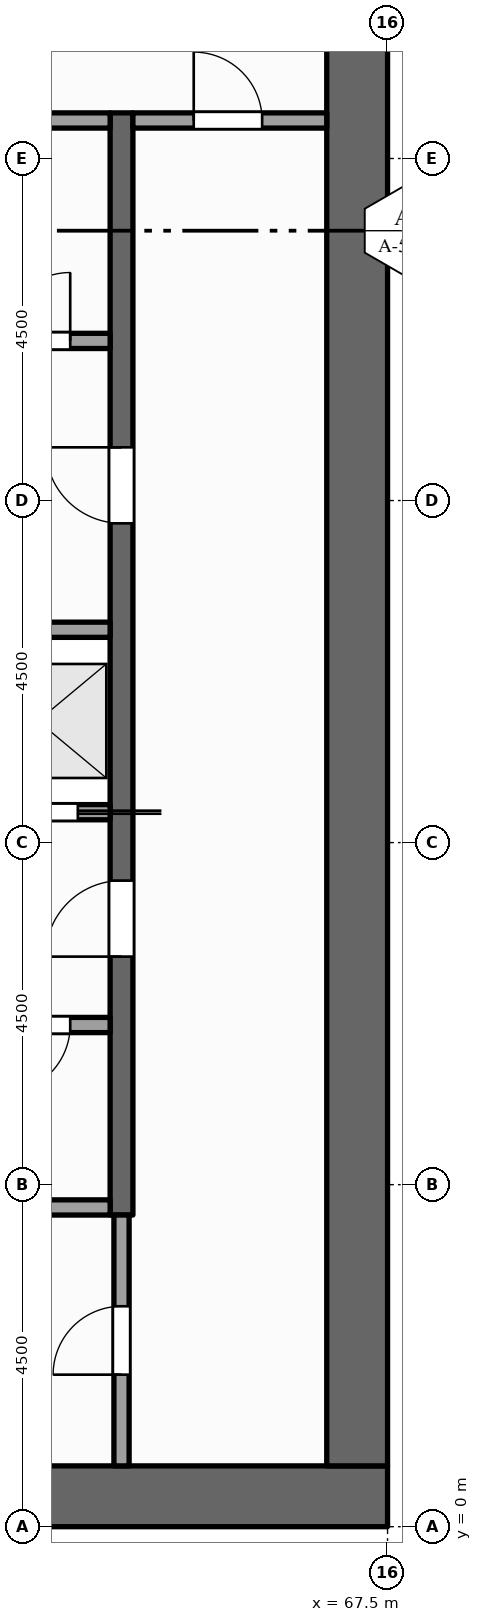
"""IFC4 building model, lengths in metres.
Left out: names, types, materials, properties, quantities, classifications, styles, units other than length and angle.
Written with IfcOpenShell. Run it as: python <this file> out.ifc"""

import sys

from ifc_helpers import new_model, si_unit, direction, frame, frame_2d, origin, place, context, subcontext, project, spatial, rectangle, extrude, element, fill, save


model = new_model("IFC4")
c1 = context("Model", 3, precision=1e-05, world=origin(), true_north=direction((0.0, 1.0)))
c2 = subcontext(c1, "Body", "Model", "MODEL_VIEW")
j1 = project(units=[si_unit("LENGTHUNIT", "METRE"), si_unit("PLANEANGLEUNIT", "RADIAN")], contexts=[c1])
p1 = place(None, origin())
s1 = spatial("IfcSite", under=j1, at=p1, CompositionType="ELEMENT")
p2 = place(p1, origin())
s2 = spatial("IfcBuilding", under=s1, at=p2, CompositionType="ELEMENT")
p3 = place(p2, frame((0.0, 0.0, 261.0)))
s3 = spatial("IfcBuildingStorey", under=s2, at=p3, CompositionType="ELEMENT", Elevation=261.0)
p4 = place(p3, frame((67.5, 0.4, -0.15), z_axis=(0.0, 0.0, 1.0), x_axis=(-1.0, 0.0, 0.0)))
e1 = element("IfcWall", 1, at=p4, inside=s3, PredefinedType="SHEAR", context=c2, shape_type="SweptSolid", body=[
    extrude(rectangle(XDim=13.5, YDim=0.8, at=frame_2d((6.75, 0.0))), origin(), (0.0, 0.0, 1.0), 4.0),
])
p5 = place(p3, frame((67.1, 0.8, -0.15), z_axis=(0.0, 0.0, 1.0), x_axis=(0.0, 1.0, 0.0)))
e2 = element("IfcWall", 2, at=p5, inside=s3, PredefinedType="SHEAR", context=c2, shape_type="SweptSolid", body=[
    extrude(rectangle(XDim=20.9, YDim=0.8, at=frame_2d((10.45, 0.0))), origin(), (0.0, 0.0, 1.0), 4.0),
])
p6 = place(p3, frame((64.0, 0.8, 0.0), z_axis=(0.0, 0.0, 1.0), x_axis=(0.0, 1.0, 0.0)))
e3 = element("IfcWall", 3, at=p6, inside=s3, PredefinedType="PARTITIONING", context=c2, shape_type="SweptSolid", body=[
    extrude(rectangle(XDim=3.3, YDim=0.2, at=frame_2d((1.65, 0.0))), origin(), (0.0, 0.0, 1.0), 3.85),
])
p7 = place(p6, frame((1.2, 0.0, 0.0)))
e4 = element("IfcOpeningElement", 4, at=p7, cuts=e3, PredefinedType="OPENING", context=c2, shape_type="SweptSolid", body=[
    extrude(rectangle(XDim=0.9, YDim=2.1, at=frame_2d((0.45, 1.05))), frame((0.0, 0.11, 0.0), z_axis=(0.0, -1.0, 0.0), x_axis=(1.0, 0.0, 0.0)), (0.0, 0.0, 1.0), 0.22),
])
p8 = place(p3, frame((64.0, 4.1, 0.0), z_axis=(0.0, 0.0, 1.0), x_axis=(0.0, 1.0, 0.0)))
e5 = element("IfcWall", 5, at=p8, inside=s3, PredefinedType="SHEAR", context=c2, shape_type="SweptSolid", body=[
    extrude(rectangle(XDim=14.5, YDim=0.3, at=frame_2d((7.25, 0.0))), origin(), (0.0, 0.0, 1.0), 3.85),
])
p9 = place(p8, frame((3.4, 0.0, 0.0)))
e6 = element("IfcOpeningElement", 6, at=p9, cuts=e5, PredefinedType="OPENING", context=c2, shape_type="SweptSolid", body=[
    extrude(rectangle(XDim=1.0, YDim=2.1, at=frame_2d((0.5, 1.05))), frame((0.0, 0.16, 0.0), z_axis=(0.0, -1.0, 0.0), x_axis=(1.0, 0.0, 0.0)), (0.0, 0.0, 1.0), 0.32),
])
p10 = place(p8, frame((9.1, 0.0, 0.0)))
e7 = element("IfcOpeningElement", 7, at=p10, cuts=e5, PredefinedType="OPENING", context=c2, shape_type="SweptSolid", body=[
    extrude(rectangle(XDim=1.0, YDim=2.1, at=frame_2d((0.5, 1.05))), frame((0.0, 0.16, 0.0), z_axis=(0.0, -1.0, 0.0), x_axis=(1.0, 0.0, 0.0)), (0.0, 0.0, 1.0), 0.32),
])
p11 = place(p3, frame((61.9, 4.2, 0.0), z_axis=(0.0, 0.0, 1.0), x_axis=(1.0, 0.0, 0.0)))
e8 = element("IfcWall", 8, at=p11, inside=s3, PredefinedType="PARTITIONING", context=c2, shape_type="SweptSolid", body=[
    extrude(rectangle(XDim=1.95, YDim=0.2, at=frame_2d((0.975, 0.0))), origin(), (0.0, 0.0, 1.0), 3.85),
])
p12 = place(p3, frame((61.9, 6.6, 0.0), z_axis=(0.0, 0.0, 1.0), x_axis=(1.0, 0.0, 0.0)))
e9 = element("IfcWall", 9, at=p12, inside=s3, PredefinedType="PARTITIONING", context=c2, shape_type="SweptSolid", body=[
    extrude(rectangle(XDim=1.95, YDim=0.2, at=frame_2d((0.975, 0.0))), origin(), (0.0, 0.0, 1.0), 3.85),
])
p13 = place(p12, frame((0.525, 0.0, 0.0)))
e10 = element("IfcOpeningElement", 10, at=p13, cuts=e9, PredefinedType="OPENING", context=c2, shape_type="SweptSolid", body=[
    extrude(rectangle(XDim=0.9, YDim=2.1, at=frame_2d((0.45, 1.05))), frame((0.0, 0.11, 0.0), z_axis=(0.0, -1.0, 0.0), x_axis=(1.0, 0.0, 0.0)), (0.0, 0.0, 1.0), 0.22),
])
p14 = place(p3, frame((61.9, 9.4, 0.0), z_axis=(0.0, 0.0, 1.0), x_axis=(1.0, 0.0, 0.0)))
e11 = element("IfcWall", 11, at=p14, inside=s3, PredefinedType="SOLIDWALL", context=c2, shape_type="SweptSolid", body=[
    extrude(rectangle(XDim=1.95, YDim=0.2, at=frame_2d((0.975, 0.0))), origin(), (0.0, 0.0, 1.0), 3.85),
])
p15 = place(p14, frame((0.425, 0.0, 0.012)))
e12 = element("IfcOpeningElement", 12, at=p15, cuts=e11, PredefinedType="OPENING", context=c2, shape_type="SweptSolid", body=[
    extrude(rectangle(XDim=1.1, YDim=2.1, at=frame_2d((0.55, 1.05))), frame((0.0, 0.11, 0.0), z_axis=(0.0, -1.0, 0.0), x_axis=(1.0, 0.0, 0.0)), (0.0, 0.0, 1.0), 0.22),
])
p16 = place(p3, frame((61.9, 11.8, 0.0), z_axis=(0.0, 0.0, 1.0), x_axis=(1.0, 0.0, 0.0)))
e13 = element("IfcWall", 13, at=p16, inside=s3, PredefinedType="SOLIDWALL", context=c2, shape_type="SweptSolid", body=[
    extrude(rectangle(XDim=1.95, YDim=0.2, at=frame_2d((0.975, 0.0))), origin(), (0.0, 0.0, 1.0), 3.85),
])
p17 = place(p3, frame((61.9, 15.6, 0.0), z_axis=(0.0, 0.0, 1.0), x_axis=(1.0, 0.0, 0.0)))
e14 = element("IfcWall", 14, at=p17, inside=s3, PredefinedType="PARTITIONING", context=c2, shape_type="SweptSolid", body=[
    extrude(rectangle(XDim=1.95, YDim=0.2, at=frame_2d((0.975, 0.0))), origin(), (0.0, 0.0, 1.0), 3.85),
])
p18 = place(p17, frame((0.525, 0.0, 0.0)))
e15 = element("IfcOpeningElement", 15, at=p18, cuts=e14, PredefinedType="OPENING", context=c2, shape_type="SweptSolid", body=[
    extrude(rectangle(XDim=0.9, YDim=2.1, at=frame_2d((0.45, 1.05))), frame((0.0, 0.11, 0.0), z_axis=(0.0, -1.0, 0.0), x_axis=(1.0, 0.0, 0.0)), (0.0, 0.0, 1.0), 0.22),
])
p19 = place(p3, frame((61.9, 18.5, 0.0), z_axis=(0.0, 0.0, 1.0), x_axis=(1.0, 0.0, 0.0)))
e16 = element("IfcWall", 16, at=p19, inside=s3, PredefinedType="PARTITIONING", context=c2, shape_type="SweptSolid", body=[
    extrude(rectangle(XDim=1.95, YDim=0.2, at=frame_2d((0.975, 0.0))), origin(), (0.0, 0.0, 1.0), 3.85),
])
p20 = place(p3, frame((64.15, 18.5, 0.0), z_axis=(0.0, 0.0, 1.0), x_axis=(1.0, 0.0, 0.0)))
e17 = element("IfcWall", 17, at=p20, inside=s3, PredefinedType="PARTITIONING", context=c2, shape_type="SweptSolid", body=[
    extrude(rectangle(XDim=2.55, YDim=0.2, at=frame_2d((1.275, 0.0))), origin(), (0.0, 0.0, 1.0), 3.85),
])
p21 = place(p20, frame((0.8, 0.0, 0.0)))
e18 = element("IfcOpeningElement", 18, at=p21, cuts=e17, PredefinedType="OPENING", context=c2, shape_type="SweptSolid", body=[
    extrude(rectangle(XDim=0.9, YDim=2.1, at=frame_2d((0.45, 1.05))), frame((0.0, 0.11, 0.0), z_axis=(0.0, -1.0, 0.0), x_axis=(1.0, 0.0, 0.0)), (0.0, 0.0, 1.0), 0.22),
])
p22 = place(p15, origin())
e19 = element("IfcDoor", 19, at=p22, inside=s3, OperationType="SLIDING_TO_RIGHT", PredefinedType="DOOR", context=c2, shape_type="SweptSolid", body=[
    extrude(rectangle(XDim=1.1, YDim=2.1, at=frame_2d((0.55, 1.05))), frame((0.0, 0.025, 0.0), z_axis=(0.0, -1.0, 0.0), x_axis=(1.0, 0.0, 0.0)), (0.0, 0.0, 1.0), 0.05),
])
fill(e12, e19)
p23 = place(p9, origin())
e20 = element("IfcDoor", 20, at=p23, inside=s3, OperationType="SINGLE_SWING_LEFT", PredefinedType="DOOR", context=c2, shape_type="SweptSolid", body=[
    extrude(rectangle(XDim=1.0, YDim=2.1, at=frame_2d((0.5, 1.05))), frame((0.0, 0.025, 0.0), z_axis=(0.0, -1.0, 0.0), x_axis=(1.0, 0.0, 0.0)), (0.0, 0.0, 1.0), 0.05),
])
fill(e6, e20)
p24 = place(p10, origin())
e21 = element("IfcDoor", 21, at=p24, inside=s3, OperationType="SINGLE_SWING_RIGHT", PredefinedType="DOOR", context=c2, shape_type="SweptSolid", body=[
    extrude(rectangle(XDim=1.0, YDim=2.1, at=frame_2d((0.5, 1.05))), frame((0.0, 0.025, 0.0), z_axis=(0.0, -1.0, 0.0), x_axis=(1.0, 0.0, 0.0)), (0.0, 0.0, 1.0), 0.05),
])
fill(e7, e21)
p25 = place(p7, origin())
e22 = element("IfcDoor", 22, at=p25, inside=s3, OperationType="SINGLE_SWING_LEFT", PredefinedType="DOOR", context=c2, shape_type="SweptSolid", body=[
    extrude(rectangle(XDim=0.9, YDim=2.1, at=frame_2d((0.45, 1.05))), frame((0.0, 0.025, 0.0), z_axis=(0.0, -1.0, 0.0), x_axis=(1.0, 0.0, 0.0)), (0.0, 0.0, 1.0), 0.05),
])
fill(e4, e22)
p26 = place(p21, origin())
e23 = element("IfcDoor", 23, at=p26, inside=s3, OperationType="SINGLE_SWING_LEFT", PredefinedType="DOOR", context=c2, shape_type="SweptSolid", body=[
    extrude(rectangle(XDim=0.9, YDim=2.1, at=frame_2d((0.45, 1.05))), frame((0.0, 0.025, 0.0), z_axis=(0.0, -1.0, 0.0), x_axis=(1.0, 0.0, 0.0)), (0.0, 0.0, 1.0), 0.05),
])
fill(e18, e23)
p27 = place(p13, origin())
e24 = element("IfcDoor", 24, at=p27, inside=s3, OperationType="SINGLE_SWING_LEFT", PredefinedType="DOOR", context=c2, shape_type="SweptSolid", body=[
    extrude(rectangle(XDim=0.9, YDim=2.1, at=frame_2d((0.45, 1.05))), frame((0.0, 0.025, 0.0), z_axis=(0.0, -1.0, 0.0), x_axis=(1.0, 0.0, 0.0)), (0.0, 0.0, 1.0), 0.05),
])
fill(e10, e24)
p28 = place(p18, origin())
e25 = element("IfcDoor", 25, at=p28, inside=s3, OperationType="SINGLE_SWING_RIGHT", PredefinedType="DOOR", context=c2, shape_type="SweptSolid", body=[
    extrude(rectangle(XDim=0.9, YDim=2.1, at=frame_2d((0.45, 1.05))), frame((0.0, 0.025, 0.0), z_axis=(0.0, -1.0, 0.0), x_axis=(1.0, 0.0, 0.0)), (0.0, 0.0, 1.0), 0.05),
])
fill(e15, e25)
save(model, sys.argv[1])
